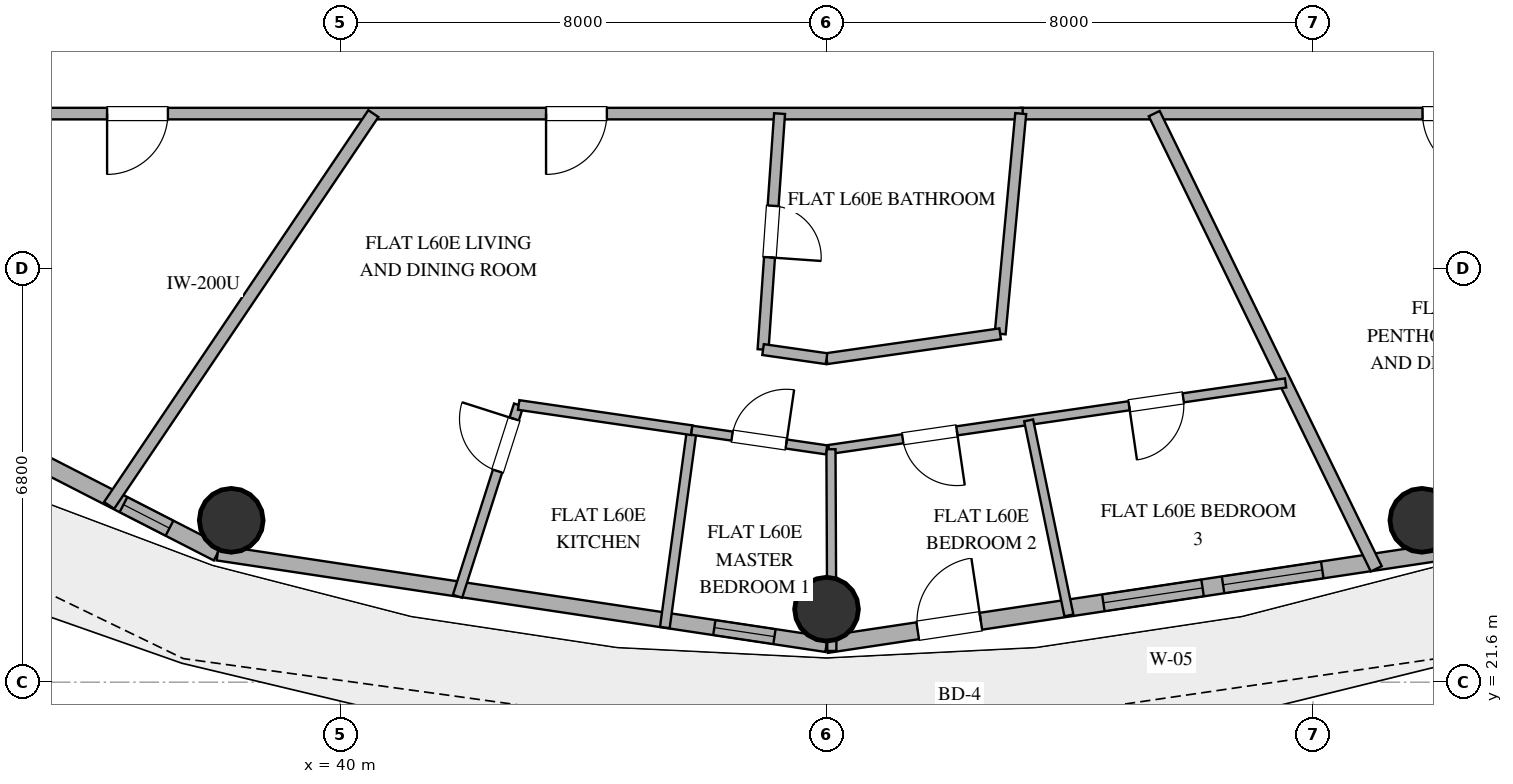
"""IFC4 building model, lengths in metres.
Left out: names, types, materials, properties, quantities, classifications, styles, units other than length and angle.
Written with IfcOpenShell. Run it as: python <this file> out.ifc"""

import sys

from ifc_helpers import new_model, si_unit, direction, frame, frame_2d, origin, origin_2d, place, context, subcontext, project, spatial, rectangle, hollow_circle, extrude, element, fill, save


model = new_model("IFC4")
c1 = context("Model", 3, precision=1e-05, world=origin(), true_north=direction((0.0, 1.0)))
c2 = subcontext(c1, "Body", "Model", "MODEL_VIEW")
j1 = project(units=[si_unit("LENGTHUNIT", "METRE"), si_unit("PLANEANGLEUNIT", "RADIAN")], contexts=[c1])
p1 = place(None, origin())
s1 = spatial("IfcSite", under=j1, at=p1, CompositionType="ELEMENT")
p2 = place(p1, origin())
s2 = spatial("IfcBuilding", under=s1, at=p2, CompositionType="ELEMENT")
p3 = place(p2, frame((0.0, 0.0, 235.2)))
s3 = spatial("IfcBuildingStorey", under=s2, at=p3, CompositionType="ELEMENT", Elevation=235.2)
for number, where, z_axis, x_axis in (
    (1, (38.209, 24.261, 0.0), (0.0, 0.0, 1.0), (1.0, 0.0, 0.0)),
    (2, (48.0, 22.8, 0.0), (0.0, 0.0, 1.0), (1.0, 0.0, 0.0)),
    (3, (57.791, 24.261, 0.0), (0.0, 0.0, 1.0), (1.0, 0.0, 0.0)),
):
    element("IfcColumn", number, at=place(p3, frame(where, z_axis=z_axis, x_axis=x_axis)), inside=s3, PredefinedType="COLUMN", context=c2, shape_type="SweptSolid", body=[
        extrude(hollow_circle(Radius=0.525, WallThickness=0.028, at=origin_2d()), origin(), (0.0, 0.0, 1.0), 3.36),
    ])
p4 = place(p3, frame((29.617, 28.013, 0.0), z_axis=(0.0, 0.0, 1.0), x_axis=(0.890007394051, -0.455946091699, 0.0)))
e4 = element("IfcWall", 4, at=p4, inside=s3, PredefinedType="SOLIDWALL", context=c2, shape_type="SweptSolid", body=[
    extrude(rectangle(XDim=9.404, YDim=0.28, at=frame_2d((4.702, 0.0))), origin(), (0.0, 0.0, 1.0), 3.36),
])
p5 = place(p4, frame((2.653, 0.0, 0.85)))
e5 = element("IfcOpeningElement", 5, at=p5, cuts=e4, PredefinedType="OPENING", context=c2, shape_type="SweptSolid", body=[
    extrude(rectangle(XDim=1.2, YDim=1.6, at=frame_2d((0.6, 0.8))), frame((0.0, 0.15, 0.0), z_axis=(0.0, -1.0, 0.0), x_axis=(1.0, 0.0, 0.0)), (0.0, 0.0, 1.0), 0.3),
])
p6 = place(p4, frame((4.93, 0.0, 0.85)))
e6 = element("IfcOpeningElement", 6, at=p6, cuts=e4, PredefinedType="OPENING", context=c2, shape_type="SweptSolid", body=[
    extrude(rectangle(XDim=1.2, YDim=1.6, at=frame_2d((0.6, 0.8))), frame((0.0, 0.15, 0.0), z_axis=(0.0, -1.0, 0.0), x_axis=(1.0, 0.0, 0.0)), (0.0, 0.0, 1.0), 0.3),
])
p7 = place(p4, frame((7.663, 0.0, 0.85)))
e7 = element("IfcOpeningElement", 7, at=p7, cuts=e4, PredefinedType="OPENING", context=c2, shape_type="SweptSolid", body=[
    extrude(rectangle(XDim=0.85, YDim=1.8, at=frame_2d((0.425, 0.9))), frame((0.0, 0.15, 0.0), z_axis=(0.0, -1.0, 0.0), x_axis=(1.0, 0.0, 0.0)), (0.0, 0.0, 1.0), 0.3),
])
p8 = place(p3, frame((37.987, 23.726, 0.0), z_axis=(0.0, 0.0, 1.0), x_axis=(0.988882522213, -0.148698881169, 0.0)))
e8 = element("IfcWall", 8, at=p8, inside=s3, PredefinedType="SOLIDWALL", context=c2, shape_type="SweptSolid", body=[
    extrude(rectangle(XDim=10.125, YDim=0.25, at=frame_2d((5.062, 0.0))), origin(), (0.0, 0.0, 1.0), 3.36),
])
p9 = place(p8, frame((8.259, 0.0, 0.35)))
e9 = element("IfcOpeningElement", 9, at=p9, cuts=e8, PredefinedType="OPENING", context=c2, shape_type="SweptSolid", body=[
    extrude(rectangle(XDim=1.0, YDim=1.05, at=frame_2d((0.5, 0.525))), frame((0.0, 0.135, 0.0), z_axis=(0.0, -1.0, 0.0), x_axis=(1.0, 0.0, 0.0)), (0.0, 0.0, 1.0), 0.27),
])
p10 = place(p3, frame((48.0, 22.22, 0.0), z_axis=(0.0, 0.0, 1.0), x_axis=(0.988882522213, 0.148698881169, 0.0)))
e10 = element("IfcWall", 10, at=p10, inside=s3, PredefinedType="SOLIDWALL", context=c2, shape_type="SweptSolid", body=[
    extrude(rectangle(XDim=10.125, YDim=0.28, at=frame_2d((5.062, 0.0))), origin(), (0.0, 0.0, 1.0), 3.36),
])
p11 = place(p10, frame((1.516, 0.0, 0.0)))
e11 = element("IfcOpeningElement", 11, at=p11, cuts=e10, PredefinedType="OPENING", context=c2, shape_type="SweptSolid", body=[
    extrude(rectangle(XDim=1.05, YDim=2.2, at=frame_2d((0.525, 1.1))), frame((0.0, 0.15, 0.0), z_axis=(0.0, -1.0, 0.0), x_axis=(1.0, 0.0, 0.0)), (0.0, 0.0, 1.0), 0.3),
])
p12 = place(p10, frame((4.604, 0.0, 0.85)))
e12 = element("IfcOpeningElement", 12, at=p12, cuts=e10, PredefinedType="OPENING", context=c2, shape_type="SweptSolid", body=[
    extrude(rectangle(XDim=1.65, YDim=2.0, at=frame_2d((0.825, 1.0))), frame((0.0, 0.15, 0.0), z_axis=(0.0, -1.0, 0.0), x_axis=(1.0, 0.0, 0.0)), (0.0, 0.0, 1.0), 0.3),
])
p13 = place(p10, frame((6.594, 0.0, 0.85)))
e13 = element("IfcOpeningElement", 13, at=p13, cuts=e10, PredefinedType="OPENING", context=c2, shape_type="SweptSolid", body=[
    extrude(rectangle(XDim=1.65, YDim=2.0, at=frame_2d((0.825, 1.0))), frame((0.0, 0.15, 0.0), z_axis=(0.0, -1.0, 0.0), x_axis=(1.0, 0.0, 0.0)), (0.0, 0.0, 1.0), 0.3),
])
p14 = place(p3, frame((63.25, 30.95, 0.0), z_axis=(0.0, 0.0, 1.0), x_axis=(-1.0, 0.0, 0.0)))
e14 = element("IfcWall", 14, at=p14, inside=s3, PredefinedType="PARTITIONING", context=c2, shape_type="SweptSolid", body=[
    extrude(rectangle(XDim=12.056, YDim=0.19, at=frame_2d((6.028, 0.0))), origin(), (0.0, 0.0, 1.0), 2.72),
])
p15 = place(p14, frame((4.448, 0.0, 0.0)))
e15 = element("IfcOpeningElement", 15, at=p15, cuts=e14, PredefinedType="OPENING", context=c2, shape_type="SweptSolid", body=[
    extrude(rectangle(XDim=1.0, YDim=2.2, at=frame_2d((0.5, 1.1))), frame((0.0, 0.105, 0.0), z_axis=(0.0, -1.0, 0.0), x_axis=(1.0, 0.0, 0.0)), (0.0, 0.0, 1.0), 0.21),
])
p16 = place(p3, frame((51.226, 30.95, 0.0), z_axis=(0.0, 0.0, 1.0), x_axis=(-1.0, 0.0, 0.0)))
e16 = element("IfcWall", 16, at=p16, inside=s3, PredefinedType="PARTITIONING", context=c2, shape_type="SweptSolid", body=[
    extrude(rectangle(XDim=18.476, YDim=0.19, at=frame_2d((9.238, 0.0))), origin(), (0.0, 0.0, 1.0), 2.72),
])
p17 = place(p16, frame((14.058, 0.0, 0.0)))
e17 = element("IfcOpeningElement", 17, at=p17, cuts=e16, PredefinedType="OPENING", context=c2, shape_type="SweptSolid", body=[
    extrude(rectangle(XDim=1.0, YDim=2.2, at=frame_2d((0.5, 1.1))), frame((0.0, 0.105, 0.0), z_axis=(0.0, -1.0, 0.0), x_axis=(1.0, 0.0, 0.0)), (0.0, 0.0, 1.0), 0.21),
])
p18 = place(p16, frame((6.839, 0.0, 0.0)))
e18 = element("IfcOpeningElement", 18, at=p18, cuts=e16, PredefinedType="OPENING", context=c2, shape_type="SweptSolid", body=[
    extrude(rectangle(XDim=1.0, YDim=2.2, at=frame_2d((0.5, 1.1))), frame((0.0, 0.105, 0.0), z_axis=(0.0, -1.0, 0.0), x_axis=(1.0, 0.0, 0.0)), (0.0, 0.0, 1.0), 0.21),
])
p19 = place(p3, frame((36.201, 24.507, 0.0), z_axis=(0.0, 0.0, 1.0), x_axis=(0.559208454265, 0.8290270832, 0.0)))
e19 = element("IfcWall", 19, at=p19, inside=s3, PredefinedType="PARTITIONING", context=c2, shape_type="SweptSolid", body=[
    extrude(rectangle(XDim=7.771, YDim=0.2, at=frame_2d((3.886, 0.0))), origin(), (0.0, 0.0, 1.0), 2.72),
])
p20 = place(p3, frame((53.389, 30.95, 0.0), z_axis=(0.0, 0.0, 1.0), x_axis=(0.438386671508, -0.898786474222, 0.0)))
e20 = element("IfcWall", 20, at=p20, inside=s3, PredefinedType="PARTITIONING", context=c2, shape_type="SweptSolid", body=[
    extrude(rectangle(XDim=8.329, YDim=0.2, at=frame_2d((4.165, 0.0))), origin(), (0.0, 0.0, 1.0), 2.72),
])
p21 = place(p3, frame((55.55, 26.521, 0.0), z_axis=(0.0, 0.0, 1.0), x_axis=(-0.989535469331, -0.144289829636, 0.0)))
e21 = element("IfcWall", 21, at=p21, inside=s3, PredefinedType="PARTITIONING", context=c2, shape_type="SweptSolid", body=[
    extrude(rectangle(XDim=7.589, YDim=0.15, at=frame_2d((3.794, 0.0))), origin(), (0.0, 0.0, 1.0), 2.72),
])
p22 = place(p21, frame((1.701, 0.0, 0.0)))
e22 = element("IfcOpeningElement", 22, at=p22, cuts=e21, PredefinedType="OPENING", context=c2, shape_type="SweptSolid", body=[
    extrude(rectangle(XDim=0.9, YDim=2.1, at=frame_2d((0.45, 1.05))), frame((0.0, 0.085, 0.0), z_axis=(0.0, -1.0, 0.0), x_axis=(1.0, 0.0, 0.0)), (0.0, 0.0, 1.0), 0.17),
])
p23 = place(p21, frame((5.464, 0.0, 0.0)))
e23 = element("IfcOpeningElement", 23, at=p23, cuts=e21, PredefinedType="OPENING", context=c2, shape_type="SweptSolid", body=[
    extrude(rectangle(XDim=0.9, YDim=2.1, at=frame_2d((0.45, 1.05))), frame((0.0, 0.085, 0.0), z_axis=(0.0, -1.0, 0.0), x_axis=(1.0, 0.0, 0.0)), (0.0, 0.0, 1.0), 0.17),
])
p24 = place(p3, frame((47.227, 30.95, 0.0), z_axis=(0.0, 0.0, 1.0), x_axis=(-0.0697885329, -0.997561807948, 0.0)))
e24 = element("IfcWall", 24, at=p24, inside=s3, PredefinedType="PLUMBINGWALL", context=c2, shape_type="SweptSolid", body=[
    extrude(rectangle(XDim=3.89, YDim=0.18, at=frame_2d((1.945, 0.0))), origin(), (0.0, 0.0, 1.0), 2.72),
])
p25 = place(p24, frame((1.52, 0.0, 0.0)))
e25 = element("IfcOpeningElement", 25, at=p25, cuts=e24, PredefinedType="OPENING", context=c2, shape_type="SweptSolid", body=[
    extrude(rectangle(XDim=0.85, YDim=2.1, at=frame_2d((0.425, 1.05))), frame((0.0, 0.1, 0.0), z_axis=(0.0, -1.0, 0.0), x_axis=(1.0, 0.0, 0.0)), (0.0, 0.0, 1.0), 0.2),
])
p26 = place(p3, frame((50.855, 27.329, 0.0), z_axis=(0.0, 0.0, 1.0), x_axis=(0.093035036072, 0.995662835534, 0.0)))
e26 = element("IfcWall", 26, at=p26, inside=s3, PredefinedType="PLUMBINGWALL", context=c2, shape_type="SweptSolid", body=[
    extrude(rectangle(XDim=3.637, YDim=0.18, at=frame_2d((1.819, 0.0))), origin(), (0.0, 0.0, 1.0), 2.72),
])
p27 = place(p3, frame((48.087, 22.113, 0.0), z_axis=(0.0, 0.0, 1.0), x_axis=(-0.004415292895, 0.999990252547, 0.0)))
e27 = element("IfcWall", 27, at=p27, inside=s3, PredefinedType="PARTITIONING", context=c2, shape_type="SweptSolid", body=[
    extrude(rectangle(XDim=3.318, YDim=0.15, at=frame_2d((1.659, 0.0))), origin(), (0.0, 0.0, 1.0), 2.72),
])
p28 = place(p3, frame((41.931, 23.013, 0.0), z_axis=(0.0, 0.0, 1.0), x_axis=(0.304448437733, 0.952528817812, 0.0)))
e28 = element("IfcWall", 28, at=p28, inside=s3, PredefinedType="PLUMBINGWALL", context=c2, shape_type="SweptSolid", body=[
    extrude(rectangle(XDim=3.302, YDim=0.16, at=frame_2d((1.651, 0.0))), origin(), (0.0, 0.0, 1.0), 2.72),
])
p29 = place(p28, frame((2.161, 0.0, 0.0)))
e29 = element("IfcOpeningElement", 29, at=p29, cuts=e28, PredefinedType="OPENING", context=c2, shape_type="SweptSolid", body=[
    extrude(rectangle(XDim=0.9, YDim=2.1, at=frame_2d((0.45, 1.05))), frame((0.0, 0.09, 0.0), z_axis=(0.0, -1.0, 0.0), x_axis=(1.0, 0.0, 0.0)), (0.0, 0.0, 1.0), 0.18),
])
p30 = place(p3, frame((45.341, 22.499, 0.0), z_axis=(0.0, 0.0, 1.0), x_axis=(0.135083263994, 0.990834250412, 0.0)))
e30 = element("IfcWall", 30, at=p30, inside=s3, PredefinedType="PLUMBINGWALL", context=c2, shape_type="SweptSolid", body=[
    extrude(rectangle(XDim=3.275, YDim=0.16, at=frame_2d((1.637, 0.0))), origin(), (0.0, 0.0, 1.0), 2.72),
])
p31 = place(p3, frame((51.324, 25.905, 0.0), z_axis=(0.0, 0.0, 1.0), x_axis=(0.202292458381, -0.979325156055, 0.0)))
e31 = element("IfcWall", 31, at=p31, inside=s3, PredefinedType="PARTITIONING", context=c2, shape_type="SweptSolid", body=[
    extrude(rectangle(XDim=3.274, YDim=0.15, at=frame_2d((1.637, 0.0))), origin(), (0.0, 0.0, 1.0), 2.72),
])
p32 = place(p3, frame((48.0, 26.92, 0.0), z_axis=(0.0, 0.0, 1.0), x_axis=(0.989910519943, 0.141693904265, 0.0)))
e32 = element("IfcWall", 32, at=p32, inside=s3, PredefinedType="PLUMBINGWALL", context=c2, shape_type="SweptSolid", body=[
    extrude(rectangle(XDim=2.884, YDim=0.18, at=frame_2d((1.442, 0.0))), origin(), (0.0, 0.0, 1.0), 2.72),
])
p33 = place(p3, frame((42.937, 26.158, 0.0), z_axis=(0.0, 0.0, 1.0), x_axis=(0.989548377589, -0.144201277427, 0.0)))
e33 = element("IfcWall", 33, at=p33, inside=s3, PredefinedType="PLUMBINGWALL", context=c2, shape_type="SweptSolid", body=[
    extrude(rectangle(XDim=2.876, YDim=0.16, at=frame_2d((1.438, 0.0))), origin(), (0.0, 0.0, 1.0), 2.72),
])
p34 = place(p3, frame((45.783, 25.743, 0.0), z_axis=(0.0, 0.0, 1.0), x_axis=(0.989520009013, -0.144395816293, 0.0)))
e34 = element("IfcWall", 34, at=p34, inside=s3, PredefinedType="PARTITIONING", context=c2, shape_type="SweptSolid", body=[
    extrude(rectangle(XDim=2.24, YDim=0.15, at=frame_2d((1.12, 0.0))), origin(), (0.0, 0.0, 1.0), 2.72),
])
p35 = place(p34, frame((0.67, 0.0, 0.0)))
e35 = element("IfcOpeningElement", 35, at=p35, cuts=e34, PredefinedType="OPENING", context=c2, shape_type="SweptSolid", body=[
    extrude(rectangle(XDim=0.9, YDim=2.1, at=frame_2d((0.45, 1.05))), frame((0.0, 0.085, 0.0), z_axis=(0.0, -1.0, 0.0), x_axis=(1.0, 0.0, 0.0)), (0.0, 0.0, 1.0), 0.17),
])
p36 = place(p3, frame((46.956, 27.069, 0.0), z_axis=(0.0, 0.0, 1.0), x_axis=(0.989917064499, -0.141648174766, 0.0)))
e36 = element("IfcWall", 36, at=p36, inside=s3, PredefinedType="PLUMBINGWALL", context=c2, shape_type="SweptSolid", body=[
    extrude(rectangle(XDim=1.055, YDim=0.18, at=frame_2d((0.527, 0.0))), origin(), (0.0, 0.0, 1.0), 2.72),
])
p37 = place(p11, origin())
e37 = element("IfcDoor", 37, at=p37, inside=s3, OperationType="SINGLE_SWING_RIGHT", PredefinedType="DOOR", context=c2, shape_type="SweptSolid", body=[
    extrude(rectangle(XDim=1.05, YDim=2.2, at=frame_2d((0.525, 1.1))), frame((0.0, 0.025, 0.0), z_axis=(0.0, -1.0, 0.0), x_axis=(1.0, 0.0, 0.0)), (0.0, 0.0, 1.0), 0.05),
])
fill(e11, e37)
p38 = place(p12, origin())
e38 = element("IfcWindow", 38, at=p38, inside=s3, PartitioningType="SINGLE_PANEL", PredefinedType="WINDOW", context=c2, shape_type="SweptSolid", body=[
    extrude(rectangle(XDim=1.65, YDim=2.0, at=frame_2d((0.825, 1.0))), frame((0.0, 0.03, 0.0), z_axis=(0.0, -1.0, 0.0), x_axis=(1.0, 0.0, 0.0)), (0.0, 0.0, 1.0), 0.06),
])
fill(e12, e38)
p39 = place(p13, origin())
e39 = element("IfcWindow", 39, at=p39, inside=s3, PartitioningType="SINGLE_PANEL", PredefinedType="WINDOW", context=c2, shape_type="SweptSolid", body=[
    extrude(rectangle(XDim=1.65, YDim=2.0, at=frame_2d((0.825, 1.0))), frame((0.0, 0.03, 0.0), z_axis=(0.0, -1.0, 0.0), x_axis=(1.0, 0.0, 0.0)), (0.0, 0.0, 1.0), 0.06),
])
fill(e13, e39)
p40 = place(p7, origin())
e40 = element("IfcWindow", 40, at=p40, inside=s3, PartitioningType="SINGLE_PANEL", PredefinedType="WINDOW", context=c2, shape_type="SweptSolid", body=[
    extrude(rectangle(XDim=0.85, YDim=1.8, at=frame_2d((0.425, 0.9))), frame((0.0, 0.03, 0.0), z_axis=(0.0, -1.0, 0.0), x_axis=(1.0, 0.0, 0.0)), (0.0, 0.0, 1.0), 0.06),
])
fill(e7, e40)
p41 = place(p9, origin())
e41 = element("IfcWindow", 41, at=p41, inside=s3, PartitioningType="SINGLE_PANEL", PredefinedType="WINDOW", context=c2, shape_type="SweptSolid", body=[
    extrude(rectangle(XDim=1.0, YDim=1.05, at=frame_2d((0.5, 0.525))), frame((0.0, 0.03, 0.0), z_axis=(0.0, -1.0, 0.0), x_axis=(1.0, 0.0, 0.0)), (0.0, 0.0, 1.0), 0.06),
])
fill(e9, e41)
p42 = place(p15, origin())
e42 = element("IfcDoor", 42, at=p42, inside=s3, OperationType="SINGLE_SWING_LEFT", PredefinedType="DOOR", context=c2, shape_type="SweptSolid", body=[
    extrude(rectangle(XDim=1.0, YDim=2.2, at=frame_2d((0.5, 1.1))), frame((0.0, 0.025, 0.0), z_axis=(0.0, -1.0, 0.0), x_axis=(1.0, 0.0, 0.0)), (0.0, 0.0, 1.0), 0.05),
])
fill(e15, e42)
p43 = place(p17, origin())
e43 = element("IfcDoor", 43, at=p43, inside=s3, OperationType="SINGLE_SWING_RIGHT", PredefinedType="DOOR", context=c2, shape_type="SweptSolid", body=[
    extrude(rectangle(XDim=1.0, YDim=2.2, at=frame_2d((0.5, 1.1))), frame((0.0, 0.025, 0.0), z_axis=(0.0, -1.0, 0.0), x_axis=(1.0, 0.0, 0.0)), (0.0, 0.0, 1.0), 0.05),
])
fill(e17, e43)
p44 = place(p18, origin())
e44 = element("IfcDoor", 44, at=p44, inside=s3, OperationType="SINGLE_SWING_RIGHT", PredefinedType="DOOR", context=c2, shape_type="SweptSolid", body=[
    extrude(rectangle(XDim=1.0, YDim=2.2, at=frame_2d((0.5, 1.1))), frame((0.0, 0.025, 0.0), z_axis=(0.0, -1.0, 0.0), x_axis=(1.0, 0.0, 0.0)), (0.0, 0.0, 1.0), 0.05),
])
fill(e18, e44)
p45 = place(p22, origin())
e45 = element("IfcDoor", 45, at=p45, inside=s3, OperationType="SINGLE_SWING_RIGHT", PredefinedType="DOOR", context=c2, shape_type="SweptSolid", body=[
    extrude(rectangle(XDim=0.9, YDim=2.1, at=frame_2d((0.45, 1.05))), frame((0.0, 0.025, 0.0), z_axis=(0.0, -1.0, 0.0), x_axis=(1.0, 0.0, 0.0)), (0.0, 0.0, 1.0), 0.05),
])
fill(e22, e45)
p46 = place(p23, origin())
e46 = element("IfcDoor", 46, at=p46, inside=s3, OperationType="SINGLE_SWING_LEFT", PredefinedType="DOOR", context=c2, shape_type="SweptSolid", body=[
    extrude(rectangle(XDim=0.9, YDim=2.1, at=frame_2d((0.45, 1.05))), frame((0.0, 0.025, 0.0), z_axis=(0.0, -1.0, 0.0), x_axis=(1.0, 0.0, 0.0)), (0.0, 0.0, 1.0), 0.05),
])
fill(e23, e46)
p47 = place(p25, origin())
e47 = element("IfcDoor", 47, at=p47, inside=s3, OperationType="SINGLE_SWING_RIGHT", PredefinedType="DOOR", context=c2, shape_type="SweptSolid", body=[
    extrude(rectangle(XDim=0.85, YDim=2.1, at=frame_2d((0.425, 1.05))), frame((0.0, 0.025, 0.0), z_axis=(0.0, -1.0, 0.0), x_axis=(1.0, 0.0, 0.0)), (0.0, 0.0, 1.0), 0.05),
])
fill(e25, e47)
p48 = place(p29, origin())
e48 = element("IfcDoor", 48, at=p48, inside=s3, OperationType="SINGLE_SWING_RIGHT", PredefinedType="DOOR", context=c2, shape_type="SweptSolid", body=[
    extrude(rectangle(XDim=0.9, YDim=2.1, at=frame_2d((0.45, 1.05))), frame((0.0, 0.025, 0.0), z_axis=(0.0, -1.0, 0.0), x_axis=(1.0, 0.0, 0.0)), (0.0, 0.0, 1.0), 0.05),
])
fill(e29, e48)
p49 = place(p35, origin())
e49 = element("IfcDoor", 49, at=p49, inside=s3, OperationType="SINGLE_SWING_RIGHT", PredefinedType="DOOR", context=c2, shape_type="SweptSolid", body=[
    extrude(rectangle(XDim=0.9, YDim=2.1, at=frame_2d((0.45, 1.05))), frame((0.0, 0.025, 0.0), z_axis=(0.0, -1.0, 0.0), x_axis=(1.0, 0.0, 0.0)), (0.0, 0.0, 1.0), 0.05),
])
fill(e35, e49)
save(model, sys.argv[1])
